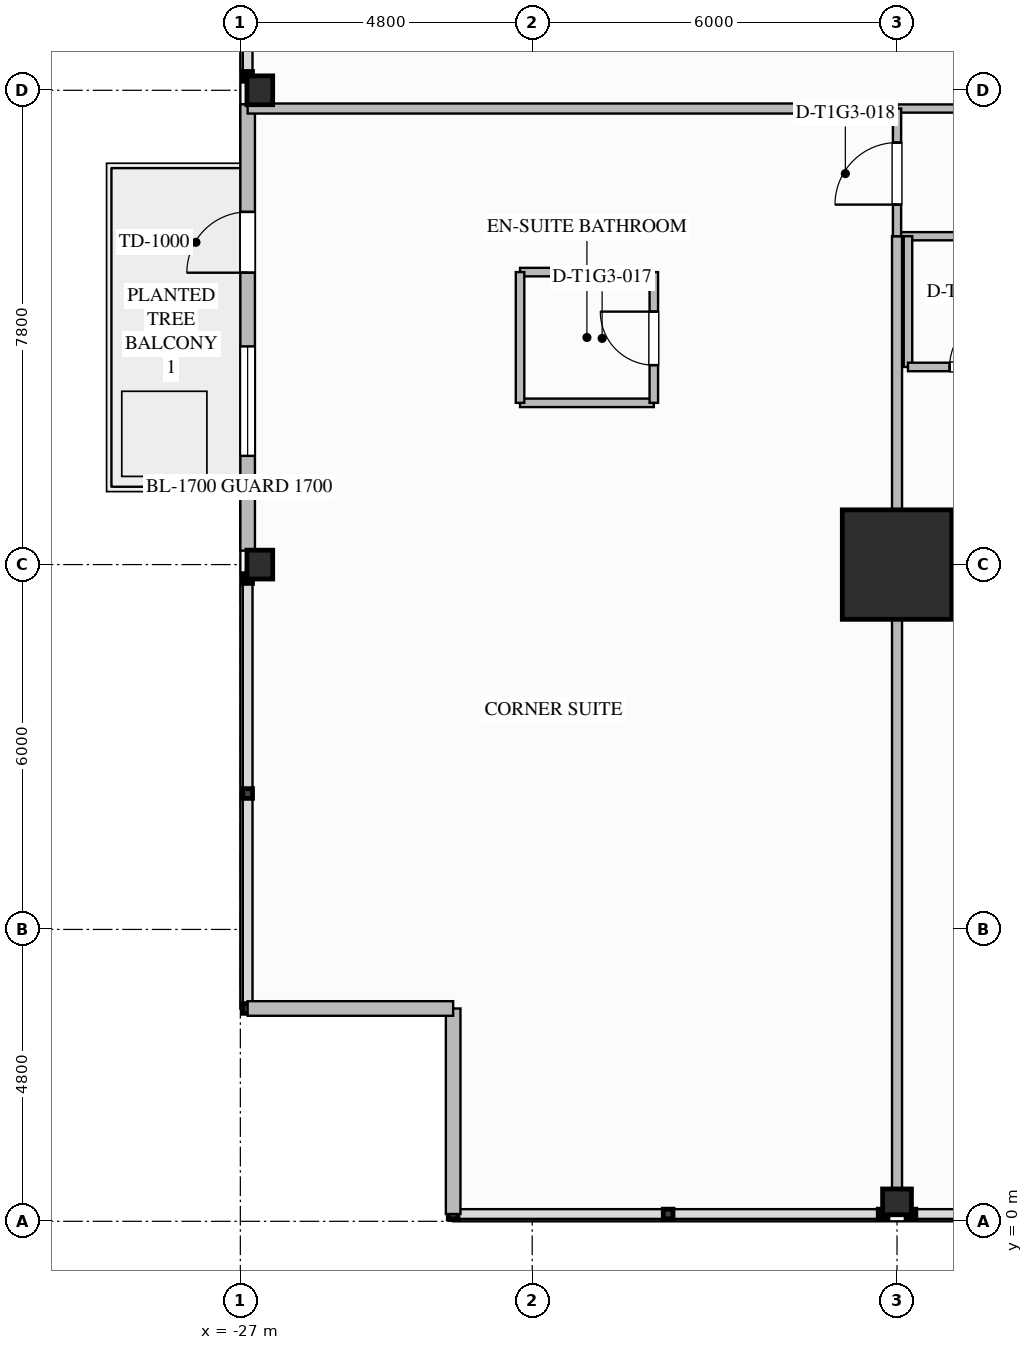
"""IFC4 building model, lengths in metres.
Left out: names, types, materials, properties, quantities, classifications, styles, units other than length and angle.
Written with IfcOpenShell. Run it as: python <this file> out.ifc"""

import sys

from ifc_helpers import new_model, si_unit, direction, frame, frame_2d, origin, origin_2d, place, context, subcontext, project, spatial, rectangle, i_section, extrude, element, fill, save


model = new_model("IFC4")
c1 = context("Model", 3, precision=1e-05, world=origin(), true_north=direction((0.0, 1.0)))
c2 = subcontext(c1, "Body", "Model", "MODEL_VIEW")
j1 = project(units=[si_unit("LENGTHUNIT", "METRE"), si_unit("PLANEANGLEUNIT", "RADIAN")], contexts=[c1])
p1 = place(None, origin())
s1 = spatial("IfcSite", under=j1, at=p1, CompositionType="ELEMENT")
p2 = place(p1, origin())
s2 = spatial("IfcBuilding", under=s1, at=p2, CompositionType="ELEMENT")
p3 = place(p2, frame((0.0, 0.0, 61.2)))
s3 = spatial("IfcBuildingStorey", under=s2, at=p3, CompositionType="ELEMENT", Elevation=61.2)
p4 = place(p3, frame((-16.2, 10.8, 0.0), z_axis=(0.0, 0.0, 1.0), x_axis=(1.0, 0.0, 0.0)))
e1 = element("IfcColumn", 1, at=p4, inside=s3, PredefinedType="COLUMN", context=c2, shape_type="SweptSolid", body=[
    extrude(rectangle(XDim=1.8, YDim=1.8, at=origin_2d()), origin(), (0.0, 0.0, 1.0), 3.5),
])
for number, where, z_axis, x_axis in (
    (2, (-26.68, 10.8, 0.0), (0.0, 0.0, 1.0), (1.0, 0.0, 0.0)),
    (3, (-26.68, 18.6, 0.0), (0.0, 0.0, 1.0), (1.0, 0.0, 0.0)),
    (4, (-16.2, 0.32, 0.0), (0.0, 0.0, 1.0), (0.0, 1.0, 0.0)),
):
    element("IfcColumn", number, at=place(p3, frame(where, z_axis=z_axis, x_axis=x_axis)), inside=s3, PredefinedType="COLUMN", context=c2, shape_type="SweptSolid", body=[
        extrude(i_section(OverallWidth=0.424, OverallDepth=0.474, WebThickness=0.048, FlangeThickness=0.077, FilletRadius=0.03, at=origin_2d()), origin(), (0.0, 0.0, 1.0), 3.497),
    ])
p5 = place(p3, frame((-26.88, 11.029, 0.0), z_axis=(0.0, 0.0, 1.0), x_axis=(0.0, 1.0, 0.0)))
e5 = element("IfcWall", 5, at=p5, inside=s3, PredefinedType="STANDARD", context=c2, shape_type="SweptSolid", body=[
    extrude(rectangle(XDim=7.342, YDim=0.24, at=frame_2d((3.671, 0.0))), origin(), (0.0, 0.0, 1.0), 2.629),
])
p6 = place(p5, frame((4.571, 0.0, 0.0)))
e6 = element("IfcOpeningElement", 6, at=p6, cuts=e5, PredefinedType="OPENING", context=c2, shape_type="SweptSolid", body=[
    extrude(rectangle(XDim=1.0, YDim=2.2, at=frame_2d((0.5, 1.1))), frame((0.0, 0.13, 0.0), z_axis=(0.0, -1.0, 0.0), x_axis=(1.0, 0.0, 0.0)), (0.0, 0.0, 1.0), 0.26),
])
p7 = place(p5, frame((1.559, 0.0, 0.75)))
e7 = element("IfcOpeningElement", 7, at=p7, cuts=e5, PredefinedType="OPENING", context=c2, shape_type="SweptSolid", body=[
    extrude(rectangle(XDim=1.8, YDim=1.779, at=frame_2d((0.9, 0.89))), frame((0.0, 0.13, 0.0), z_axis=(0.0, -1.0, 0.0), x_axis=(1.0, 0.0, 0.0)), (0.0, 0.0, 1.0), 0.26),
])
for number, where, z_axis, x_axis in (
    (8, (-23.5, 0.12, 0.0), (0.0, 0.0, 1.0), (0.0, 1.0, 0.0)),
    (9, (-23.5, 3.5, 0.0), (0.0, 0.0, 1.0), (-1.0, 0.0, 0.0)),
):
    element("IfcWall", number, at=place(p3, frame(where, z_axis=z_axis, x_axis=x_axis)), inside=s3, PredefinedType="STANDARD", context=c2, shape_type="SweptSolid", body=[
        extrude(rectangle(XDim=3.38, YDim=0.24, at=frame_2d((1.69, 0.0))), origin(), (0.0, 0.0, 1.0), 3.24),
    ])
p8 = place(p3, frame((-16.2, 16.2, 0.0), z_axis=(0.0, 0.0, 1.0), x_axis=(1.0, 0.0, 0.0)))
e10 = element("IfcWall", 10, at=p8, inside=s3, PredefinedType="PARTITIONING", context=c2, shape_type="SweptSolid", body=[
    extrude(rectangle(XDim=32.4, YDim=0.135, at=frame_2d((16.2, 0.0))), origin(), (0.0, 0.0, 1.0), 3.24),
])
p9 = place(p8, frame((3.285, 0.0, 0.0)))
e11 = element("IfcOpeningElement", 11, at=p9, cuts=e10, PredefinedType="OPENING", context=c2, shape_type="SweptSolid", body=[
    extrude(rectangle(XDim=1.26, YDim=2.2, at=frame_2d((0.63, 1.1))), frame((0.0, 0.077, 0.0), z_axis=(0.0, -1.0, 0.0), x_axis=(1.0, 0.0, 0.0)), (0.0, 0.0, 1.0), 0.155),
])
p10 = place(p8, frame((7.335, 0.0, 0.0)))
e12 = element("IfcOpeningElement", 12, at=p10, cuts=e10, PredefinedType="OPENING", context=c2, shape_type="SweptSolid", body=[
    extrude(rectangle(XDim=1.26, YDim=2.2, at=frame_2d((0.63, 1.1))), frame((0.0, 0.077, 0.0), z_axis=(0.0, -1.0, 0.0), x_axis=(1.0, 0.0, 0.0)), (0.0, 0.0, 1.0), 0.155),
])
p11 = place(p8, frame((15.84, 0.0, 0.0)))
e13 = element("IfcOpeningElement", 13, at=p11, cuts=e10, PredefinedType="OPENING", context=c2, shape_type="SweptSolid", body=[
    extrude(rectangle(XDim=1.26, YDim=2.2, at=frame_2d((0.63, 1.1))), frame((0.0, 0.077, 0.0), z_axis=(0.0, -1.0, 0.0), x_axis=(1.0, 0.0, 0.0)), (0.0, 0.0, 1.0), 0.155),
])
p12 = place(p8, frame((20.835, 0.0, 0.0)))
e14 = element("IfcOpeningElement", 14, at=p12, cuts=e10, PredefinedType="OPENING", context=c2, shape_type="SweptSolid", body=[
    extrude(rectangle(XDim=1.26, YDim=2.2, at=frame_2d((0.63, 1.1))), frame((0.0, 0.077, 0.0), z_axis=(0.0, -1.0, 0.0), x_axis=(1.0, 0.0, 0.0)), (0.0, 0.0, 1.0), 0.155),
])
p13 = place(p8, frame((29.475, 0.0, 0.0)))
e15 = element("IfcOpeningElement", 15, at=p13, cuts=e10, PredefinedType="OPENING", context=c2, shape_type="SweptSolid", body=[
    extrude(rectangle(XDim=1.26, YDim=2.2, at=frame_2d((0.63, 1.1))), frame((0.0, 0.077, 0.0), z_axis=(0.0, -1.0, 0.0), x_axis=(1.0, 0.0, 0.0)), (0.0, 0.0, 1.0), 0.155),
])
p14 = place(p3, frame((-16.2, 18.3, 0.0), z_axis=(0.0, 0.0, 1.0), x_axis=(1.0, 0.0, 0.0)))
e16 = element("IfcWall", 16, at=p14, inside=s3, PredefinedType="PARTITIONING", context=c2, shape_type="SweptSolid", body=[
    extrude(rectangle(XDim=5.4, YDim=0.135, at=frame_2d((2.7, 0.0))), origin(), (0.0, 0.0, 1.0), 3.24),
])
p15 = place(p3, frame((-16.2, 0.12, 0.0), z_axis=(0.0, 0.0, 1.0), x_axis=(0.0, 1.0, 0.0)))
e17 = element("IfcWall", 17, at=p15, inside=s3, PredefinedType="PARTITIONING", context=c2, shape_type="SweptSolid", body=[
    extrude(rectangle(XDim=16.08, YDim=0.165, at=frame_2d((8.04, 0.0))), origin(), (0.0, 0.0, 1.0), 2.452),
])
p16 = place(p3, frame((-26.88, 18.3, 0.0), z_axis=(0.0, 0.0, 1.0), x_axis=(1.0, 0.0, 0.0)))
e18 = element("IfcWall", 18, at=p16, inside=s3, PredefinedType="PARTITIONING", context=c2, shape_type="SweptSolid", body=[
    extrude(rectangle(XDim=10.68, YDim=0.165, at=frame_2d((5.34, 0.0))), origin(), (0.0, 0.0, 1.0), 2.452),
])
p17 = place(p3, frame((-16.2, 16.2, 0.0), z_axis=(0.0, 0.0, 1.0), x_axis=(0.0, 1.0, 0.0)))
e19 = element("IfcWall", 19, at=p17, inside=s3, PredefinedType="PARTITIONING", context=c2, shape_type="SweptSolid", body=[
    extrude(rectangle(XDim=2.1, YDim=0.135, at=frame_2d((1.05, 0.0))), origin(), (0.0, 0.0, 1.0), 2.452),
])
p18 = place(p17, frame((0.52, 0.0, 0.0)))
e20 = element("IfcOpeningElement", 20, at=p18, cuts=e19, PredefinedType="OPENING", context=c2, shape_type="SweptSolid", body=[
    extrude(rectangle(XDim=1.02, YDim=2.15, at=frame_2d((0.51, 1.075))), frame((0.0, 0.077, 0.0), z_axis=(0.0, -1.0, 0.0), x_axis=(1.0, 0.0, 0.0)), (0.0, 0.0, 1.0), 0.155),
])
for number, where, z_axis, x_axis in (
    (21, (-22.4, 13.46, 0.0), (0.0, 0.0, 1.0), (1.0, 0.0, 0.0)),
    (22, (-22.4, 15.61, 0.0), (0.0, 0.0, 1.0), (1.0, 0.0, 0.0)),
):
    element("IfcWall", number, at=place(p3, frame(where, z_axis=z_axis, x_axis=x_axis)), inside=s3, PredefinedType="PLUMBINGWALL", context=c2, shape_type="SweptSolid", body=[
        extrude(rectangle(XDim=2.2, YDim=0.14, at=frame_2d((1.1, 0.0))), origin(), (0.0, 0.0, 1.0), 3.24),
    ])
p19 = place(p3, frame((-22.4, 13.46, 0.0), z_axis=(0.0, 0.0, 1.0), x_axis=(0.0, 1.0, 0.0)))
e23 = element("IfcWall", 23, at=p19, inside=s3, PredefinedType="PLUMBINGWALL", context=c2, shape_type="SweptSolid", body=[
    extrude(rectangle(XDim=2.15, YDim=0.14, at=frame_2d((1.075, 0.0))), origin(), (0.0, 0.0, 1.0), 3.24),
])
p20 = place(p3, frame((-20.2, 13.46, 0.0), z_axis=(0.0, 0.0, 1.0), x_axis=(0.0, 1.0, 0.0)))
e24 = element("IfcWall", 24, at=p20, inside=s3, PredefinedType="PLUMBINGWALL", context=c2, shape_type="SweptSolid", body=[
    extrude(rectangle(XDim=2.15, YDim=0.14, at=frame_2d((1.075, 0.0))), origin(), (0.0, 0.0, 1.0), 3.24),
])
p21 = place(p20, frame((0.62, 0.0, 0.0)))
e25 = element("IfcOpeningElement", 25, at=p21, cuts=e24, PredefinedType="OPENING", context=c2, shape_type="SweptSolid", body=[
    extrude(rectangle(XDim=0.88, YDim=2.1, at=frame_2d((0.44, 1.05))), frame((0.0, 0.08, 0.0), z_axis=(0.0, -1.0, 0.0), x_axis=(1.0, 0.0, 0.0)), (0.0, 0.0, 1.0), 0.16),
])
p22 = place(p3, frame((-16.02, 16.2, 0.0), z_axis=(0.0, 0.0, 1.0), x_axis=(0.0, -1.0, 0.0)))
e26 = element("IfcWall", 26, at=p22, inside=s3, PredefinedType="PLUMBINGWALL", context=c2, shape_type="SweptSolid", body=[
    extrude(rectangle(XDim=2.15, YDim=0.14, at=frame_2d((1.075, 0.0))), origin(), (0.0, 0.0, 1.0), 2.452),
])
p23 = place(p3, frame((-16.02, 14.05, 0.0), z_axis=(0.0, 0.0, 1.0), x_axis=(1.0, 0.0, 0.0)))
e27 = element("IfcWall", 27, at=p23, inside=s3, PredefinedType="PLUMBINGWALL", context=c2, shape_type="SweptSolid", body=[
    extrude(rectangle(XDim=2.25, YDim=0.14, at=frame_2d((1.125, 0.0))), origin(), (0.0, 0.0, 1.0), 3.24),
])
p24 = place(p23, frame((0.685, 0.0, 0.0)))
e28 = element("IfcOpeningElement", 28, at=p24, cuts=e27, PredefinedType="OPENING", context=c2, shape_type="SweptSolid", body=[
    extrude(rectangle(XDim=0.88, YDim=2.1, at=frame_2d((0.44, 1.05))), frame((0.0, 0.08, 0.0), z_axis=(0.0, -1.0, 0.0), x_axis=(1.0, 0.0, 0.0)), (0.0, 0.0, 1.0), 0.16),
])
p25 = place(p6, origin())
e29 = element("IfcDoor", 29, at=p25, inside=s3, OperationType="SINGLE_SWING_LEFT", PredefinedType="DOOR", context=c2, shape_type="SweptSolid", body=[
    extrude(rectangle(XDim=1.0, YDim=2.2, at=frame_2d((0.5, 1.1))), frame((0.0, 0.025, 0.0), z_axis=(0.0, -1.0, 0.0), x_axis=(1.0, 0.0, 0.0)), (0.0, 0.0, 1.0), 0.05),
])
fill(e6, e29)
p26 = place(p7, origin())
e30 = element("IfcWindow", 30, at=p26, inside=s3, PartitioningType="SINGLE_PANEL", PredefinedType="WINDOW", context=c2, shape_type="SweptSolid", body=[
    extrude(rectangle(XDim=1.8, YDim=1.779, at=frame_2d((0.9, 0.89))), frame((0.0, 0.03, 0.0), z_axis=(0.0, -1.0, 0.0), x_axis=(1.0, 0.0, 0.0)), (0.0, 0.0, 1.0), 0.06),
])
fill(e7, e30)
p27 = place(p21, origin())
e31 = element("IfcDoor", 31, at=p27, inside=s3, OperationType="SINGLE_SWING_RIGHT", PredefinedType="DOOR", context=c2, shape_type="SweptSolid", body=[
    extrude(rectangle(XDim=0.88, YDim=2.1, at=frame_2d((0.44, 1.05))), frame((0.0, 0.025, 0.0), z_axis=(0.0, -1.0, 0.0), x_axis=(1.0, 0.0, 0.0)), (0.0, 0.0, 1.0), 0.05),
])
fill(e25, e31)
p28 = place(p18, origin())
e32 = element("IfcDoor", 32, at=p28, inside=s3, OperationType="SINGLE_SWING_LEFT", PredefinedType="DOOR", context=c2, shape_type="SweptSolid", body=[
    extrude(rectangle(XDim=1.02, YDim=2.15, at=frame_2d((0.51, 1.075))), frame((0.0, 0.025, 0.0), z_axis=(0.0, -1.0, 0.0), x_axis=(1.0, 0.0, 0.0)), (0.0, 0.0, 1.0), 0.05),
])
fill(e20, e32)
p29 = place(p24, origin())
e33 = element("IfcDoor", 33, at=p29, inside=s3, OperationType="SINGLE_SWING_RIGHT", PredefinedType="DOOR", context=c2, shape_type="SweptSolid", body=[
    extrude(rectangle(XDim=0.88, YDim=2.1, at=frame_2d((0.44, 1.05))), frame((0.0, 0.025, 0.0), z_axis=(0.0, -1.0, 0.0), x_axis=(1.0, 0.0, 0.0)), (0.0, 0.0, 1.0), 0.05),
])
fill(e28, e33)
save(model, sys.argv[1])
